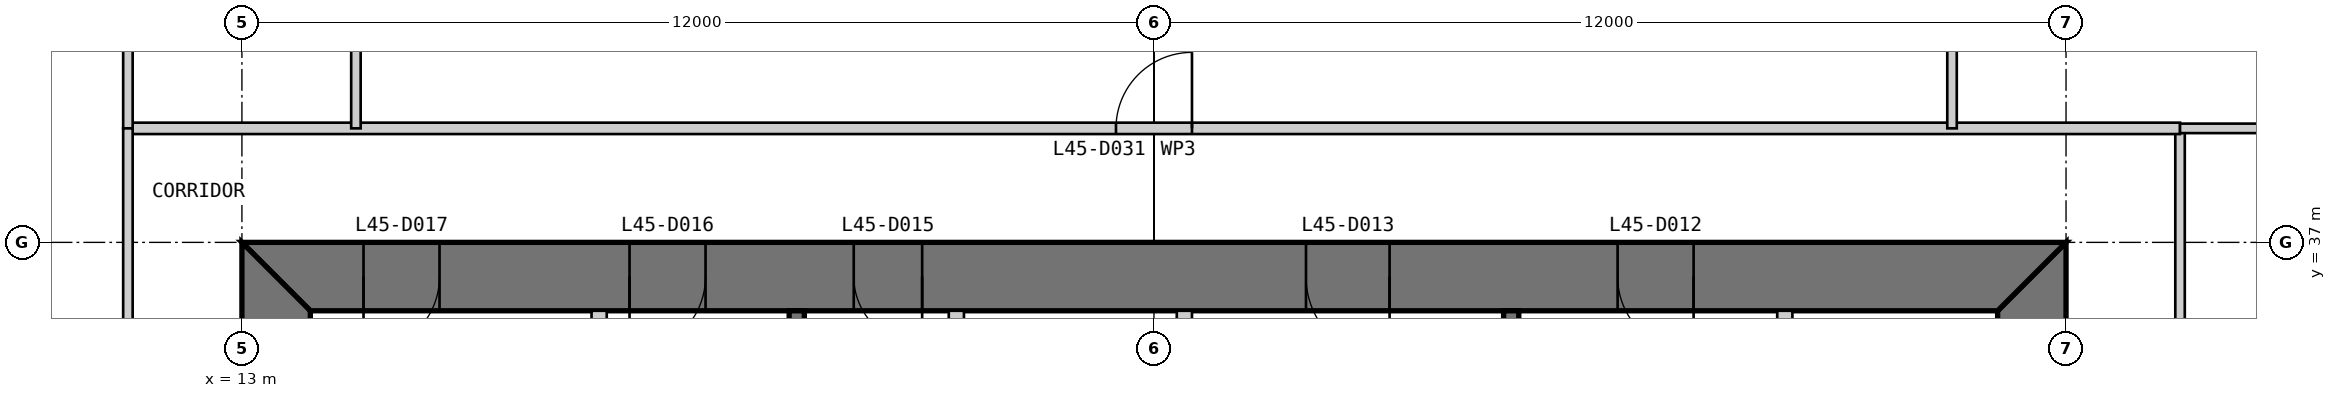
"""IFC4 building model, lengths in metres.
Left out: names, types, materials, properties, quantities, classifications, styles, units other than length and angle.
Written with IfcOpenShell. Run it as: python <this file> out.ifc"""

import sys

from ifc_helpers import new_model, si_unit, direction, frame, frame_2d, origin, place, context, subcontext, project, spatial, polyline, rectangle, outline, extrude, element, fill, save


model = new_model("IFC4")
c1 = context("Model", 3, precision=1e-05, world=origin(), true_north=direction((0.0, 1.0)))
c2 = subcontext(c1, "Body", "Model", "MODEL_VIEW")
j1 = project(units=[si_unit("LENGTHUNIT", "METRE"), si_unit("PLANEANGLEUNIT", "RADIAN")], contexts=[c1])
p1 = place(None, origin())
s1 = spatial("IfcSite", under=j1, at=p1, CompositionType="ELEMENT")
p2 = place(p1, origin())
s2 = spatial("IfcBuilding", under=s1, at=p2, CompositionType="ELEMENT")
p3 = place(p2, frame((0.0, 0.0, 193.8)))
s3 = spatial("IfcBuildingStorey", under=s2, at=p3, CompositionType="ELEMENT", Elevation=193.8)
p4 = place(p3, frame((36.55, 13.9, 0.0), z_axis=(0.0, 0.0, 1.0), x_axis=(0.0, 1.0, 0.0)))
e1 = element("IfcWall", 1, at=p4, inside=s3, PredefinedType="SHEAR", context=c2, shape_type="SweptSolid", body=[
    extrude(outline(polyline([(-0.9, -0.45), (23.1, -0.45), (22.2, 0.45), (0.0, 0.45), (-0.9, -0.45)])), origin(), (0.0, 0.0, 1.0), 4.0),
])
p5 = place(p4, frame((20.2, 0.0, 0.0)))
e2 = element("IfcOpeningElement", 2, at=p5, cuts=e1, PredefinedType="OPENING", context=c2, shape_type="SweptSolid", body=[
    extrude(rectangle(XDim=1.0, YDim=2.2, at=frame_2d((0.5, 1.1))), frame((0.0, 0.46, 0.0), z_axis=(0.0, -1.0, 0.0), x_axis=(1.0, 0.0, 0.0)), (0.0, 0.0, 1.0), 0.92),
])
p6 = place(p4, frame((17.25, 0.0, 0.0)))
e3 = element("IfcOpeningElement", 3, at=p6, cuts=e1, PredefinedType="OPENING", context=c2, shape_type="SweptSolid", body=[
    extrude(rectangle(XDim=0.9, YDim=2.2, at=frame_2d((0.45, 1.1))), frame((0.0, 0.46, 0.0), z_axis=(0.0, -1.0, 0.0), x_axis=(1.0, 0.0, 0.0)), (0.0, 0.0, 1.0), 0.92),
])
p7 = place(p3, frame((37.0, 36.55, 0.0), z_axis=(0.0, 0.0, 1.0), x_axis=(-1.0, 0.0, 0.0)))
e4 = element("IfcWall", 4, at=p7, inside=s3, PredefinedType="SHEAR", context=c2, shape_type="SweptSolid", body=[
    extrude(outline(polyline([(0.0, -0.45), (24.0, -0.45), (23.1, 0.45), (0.9, 0.45), (0.0, -0.45)])), origin(), (0.0, 0.0, 1.0), 4.0),
])
p8 = place(p7, frame((4.9, 0.0, 0.0)))
e5 = element("IfcOpeningElement", 5, at=p8, cuts=e4, PredefinedType="OPENING", context=c2, shape_type="SweptSolid", body=[
    extrude(rectangle(XDim=1.0, YDim=2.2, at=frame_2d((0.5, 1.1))), frame((0.0, 0.46, 0.0), z_axis=(0.0, -1.0, 0.0), x_axis=(1.0, 0.0, 0.0)), (0.0, 0.0, 1.0), 0.92),
])
p9 = place(p7, frame((8.9, 0.0, 0.0)))
e6 = element("IfcOpeningElement", 6, at=p9, cuts=e4, PredefinedType="OPENING", context=c2, shape_type="SweptSolid", body=[
    extrude(rectangle(XDim=1.1, YDim=2.2, at=frame_2d((0.55, 1.1))), frame((0.0, 0.46, 0.0), z_axis=(0.0, -1.0, 0.0), x_axis=(1.0, 0.0, 0.0)), (0.0, 0.0, 1.0), 0.92),
])
p10 = place(p7, frame((15.05, 0.0, 0.0)))
e7 = element("IfcOpeningElement", 7, at=p10, cuts=e4, PredefinedType="OPENING", context=c2, shape_type="SweptSolid", body=[
    extrude(rectangle(XDim=0.9, YDim=2.2, at=frame_2d((0.45, 1.1))), frame((0.0, 0.46, 0.0), z_axis=(0.0, -1.0, 0.0), x_axis=(1.0, 0.0, 0.0)), (0.0, 0.0, 1.0), 0.92),
])
p11 = place(p7, frame((17.9, 0.0, 0.0)))
e8 = element("IfcOpeningElement", 8, at=p11, cuts=e4, PredefinedType="OPENING", context=c2, shape_type="SweptSolid", body=[
    extrude(rectangle(XDim=1.0, YDim=2.2, at=frame_2d((0.5, 1.1))), frame((0.0, 0.46, 0.0), z_axis=(0.0, -1.0, 0.0), x_axis=(1.0, 0.0, 0.0)), (0.0, 0.0, 1.0), 0.92),
])
p12 = place(p7, frame((21.4, 0.0, 0.0)))
e9 = element("IfcOpeningElement", 9, at=p12, cuts=e4, PredefinedType="OPENING", context=c2, shape_type="SweptSolid", body=[
    extrude(rectangle(XDim=1.0, YDim=2.2, at=frame_2d((0.5, 1.1))), frame((0.0, 0.46, 0.0), z_axis=(0.0, -1.0, 0.0), x_axis=(1.0, 0.0, 0.0)), (0.0, 0.0, 1.0), 0.92),
])
p13 = place(p3, frame((13.45, 36.1, 0.0), z_axis=(0.0, 0.0, 1.0), x_axis=(0.0, -1.0, 0.0)))
e10 = element("IfcWall", 10, at=p13, inside=s3, PredefinedType="SHEAR", context=c2, shape_type="SweptSolid", body=[
    extrude(outline(polyline([(-0.9, -0.45), (23.1, -0.45), (22.2, 0.45), (0.0, 0.45), (-0.9, -0.45)])), origin(), (0.0, 0.0, 1.0), 4.0),
])
p14 = place(p13, frame((20.2, 0.0, 0.0)))
e11 = element("IfcOpeningElement", 11, at=p14, cuts=e10, PredefinedType="OPENING", context=c2, shape_type="SweptSolid", body=[
    extrude(rectangle(XDim=1.0, YDim=2.2, at=frame_2d((0.5, 1.1))), frame((0.0, 0.46, 0.0), z_axis=(0.0, -1.0, 0.0), x_axis=(1.0, 0.0, 0.0)), (0.0, 0.0, 1.0), 0.92),
])
p15 = place(p13, frame((17.25, 0.0, 0.0)))
e12 = element("IfcOpeningElement", 12, at=p15, cuts=e10, PredefinedType="OPENING", context=c2, shape_type="SweptSolid", body=[
    extrude(rectangle(XDim=0.9, YDim=2.2, at=frame_2d((0.45, 1.1))), frame((0.0, 0.46, 0.0), z_axis=(0.0, -1.0, 0.0), x_axis=(1.0, 0.0, 0.0)), (0.0, 0.0, 1.0), 0.92),
])
p16 = place(p3, frame((33.3, 36.1, 0.0), z_axis=(0.0, 0.0, 1.0), x_axis=(0.0, -1.0, 0.0)))
e13 = element("IfcWall", 13, at=p16, inside=s3, PredefinedType="PARTITIONING", context=c2, shape_type="SweptSolid", body=[
    extrude(rectangle(XDim=16.1, YDim=0.2, at=frame_2d((8.05, 0.0))), origin(), (0.0, 0.0, 1.0), 3.8),
])
p17 = place(p16, frame((4.1, 0.0, 0.0)))
e14 = element("IfcOpeningElement", 14, at=p17, cuts=e13, PredefinedType="OPENING", context=c2, shape_type="SweptSolid", body=[
    extrude(rectangle(XDim=0.9, YDim=2.2, at=frame_2d((0.45, 1.1))), frame((0.0, 0.11, 0.0), z_axis=(0.0, -1.0, 0.0), x_axis=(1.0, 0.0, 0.0)), (0.0, 0.0, 1.0), 0.22),
])
p18 = place(p3, frame((29.7, 36.1, 0.0), z_axis=(0.0, 0.0, 1.0), x_axis=(0.0, -1.0, 0.0)))
e15 = element("IfcWall", 15, at=p18, inside=s3, PredefinedType="SOLIDWALL", context=c2, shape_type="SweptSolid", body=[
    extrude(rectangle(XDim=16.1, YDim=0.2, at=frame_2d((8.05, 0.0))), origin(), (0.0, 0.0, 1.0), 3.8),
])
p19 = place(p18, frame((7.217, 0.0, 0.0)))
e16 = element("IfcOpeningElement", 16, at=p19, cuts=e15, PredefinedType="OPENING", context=c2, shape_type="SweptSolid", body=[
    extrude(rectangle(XDim=1.1, YDim=2.2, at=frame_2d((0.55, 1.1))), frame((0.0, 0.11, 0.0), z_axis=(0.0, -1.0, 0.0), x_axis=(1.0, 0.0, 0.0)), (0.0, 0.0, 1.0), 0.22),
])
p20 = place(p18, frame((10.55, 0.0, 0.0)))
e17 = element("IfcOpeningElement", 17, at=p20, cuts=e15, PredefinedType="OPENING", context=c2, shape_type="SweptSolid", body=[
    extrude(rectangle(XDim=1.1, YDim=2.2, at=frame_2d((0.55, 1.1))), frame((0.0, 0.11, 0.0), z_axis=(0.0, -1.0, 0.0), x_axis=(1.0, 0.0, 0.0)), (0.0, 0.0, 1.0), 0.22),
])
p21 = place(p18, frame((13.883, 0.0, 0.0)))
e18 = element("IfcOpeningElement", 18, at=p21, cuts=e15, PredefinedType="OPENING", context=c2, shape_type="SweptSolid", body=[
    extrude(rectangle(XDim=1.1, YDim=2.2, at=frame_2d((0.55, 1.1))), frame((0.0, 0.11, 0.0), z_axis=(0.0, -1.0, 0.0), x_axis=(1.0, 0.0, 0.0)), (0.0, 0.0, 1.0), 0.22),
])
p22 = place(p3, frame((25.4, 36.1, 0.0), z_axis=(0.0, 0.0, 1.0), x_axis=(0.0, -1.0, 0.0)))
e19 = element("IfcWall", 19, at=p22, inside=s3, PredefinedType="PARTITIONING", context=c2, shape_type="SweptSolid", body=[
    extrude(rectangle(XDim=3.3, YDim=0.2, at=frame_2d((1.65, 0.0))), origin(), (0.0, 0.0, 1.0), 3.8),
])
p23 = place(p22, frame((0.9, 0.0, 0.0)))
e20 = element("IfcOpeningElement", 20, at=p23, cuts=e19, PredefinedType="OPENING", context=c2, shape_type="SweptSolid", body=[
    extrude(rectangle(XDim=1.1, YDim=2.2, at=frame_2d((0.55, 1.1))), frame((0.0, 0.11, 0.0), z_axis=(0.0, -1.0, 0.0), x_axis=(1.0, 0.0, 0.0)), (0.0, 0.0, 1.0), 0.22),
])
p24 = place(p3, frame((22.4, 36.1, 0.0), z_axis=(0.0, 0.0, 1.0), x_axis=(0.0, -1.0, 0.0)))
e21 = element("IfcWall", 21, at=p24, inside=s3, PredefinedType="PARTITIONING", context=c2, shape_type="SweptSolid", body=[
    extrude(rectangle(XDim=3.3, YDim=0.2, at=frame_2d((1.65, 0.0))), origin(), (0.0, 0.0, 1.0), 3.8),
])
p25 = place(p3, frame((20.3, 36.1, 0.0), z_axis=(0.0, 0.0, 1.0), x_axis=(0.0, -1.0, 0.0)))
e22 = element("IfcWall", 22, at=p25, inside=s3, PredefinedType="SOLIDWALL", context=c2, shape_type="SweptSolid", body=[
    extrude(rectangle(XDim=6.1, YDim=0.2, at=frame_2d((3.05, 0.0))), origin(), (0.0, 0.0, 1.0), 3.8),
])
p26 = place(p3, frame((17.7, 36.1, 0.0), z_axis=(0.0, 0.0, 1.0), x_axis=(0.0, -1.0, 0.0)))
e23 = element("IfcWall", 23, at=p26, inside=s3, PredefinedType="PARTITIONING", context=c2, shape_type="SweptSolid", body=[
    extrude(rectangle(XDim=6.1, YDim=0.2, at=frame_2d((3.05, 0.0))), origin(), (0.0, 0.0, 1.0), 3.8),
])
p27 = place(p3, frame((38.5, 35.5, 0.0), z_axis=(0.0, 0.0, 1.0), x_axis=(0.0, 1.0, 0.0)))
e24 = element("IfcWall", 24, at=p27, inside=s3, PredefinedType="PARTITIONING", context=c2, shape_type="SweptSolid", body=[
    extrude(rectangle(XDim=3.0, YDim=0.125, at=frame_2d((1.5, 0.0))), origin(), (0.0, 0.0, 1.0), 3.85),
])
p28 = place(p3, frame((38.5, 38.5, 0.0), z_axis=(0.0, 0.0, 1.0), x_axis=(-1.0, 0.0, 0.0)))
e25 = element("IfcWall", 25, at=p28, inside=s3, PredefinedType="PARTITIONING", context=c2, shape_type="SweptSolid", body=[
    extrude(rectangle(XDim=27.0, YDim=0.15, at=frame_2d((13.5, 0.0))), origin(), (0.0, 0.0, 1.0), 3.85),
])
p29 = place(p28, frame((13.0, 0.0, 0.0)))
e26 = element("IfcOpeningElement", 26, at=p29, cuts=e25, PredefinedType="OPENING", context=c2, shape_type="SweptSolid", body=[
    extrude(rectangle(XDim=1.0, YDim=2.2, at=frame_2d((0.5, 1.1))), frame((0.0, 0.085, 0.0), z_axis=(0.0, -1.0, 0.0), x_axis=(1.0, 0.0, 0.0)), (0.0, 0.0, 1.0), 0.17),
])
p30 = place(p3, frame((49.85, 38.5, 0.0), z_axis=(0.0, 0.0, 1.0), x_axis=(-1.0, 0.0, 0.0)))
e27 = element("IfcWall", 27, at=p30, inside=s3, PredefinedType="PARTITIONING", context=c2, shape_type="SweptSolid", body=[
    extrude(rectangle(XDim=11.35, YDim=0.125, at=frame_2d((5.675, 0.0))), origin(), (0.0, 0.0, 1.0), 3.85),
])
p31 = place(p3, frame((35.5, 49.85, 0.0), z_axis=(0.0, 0.0, 1.0), x_axis=(0.0, -1.0, 0.0)))
e28 = element("IfcWall", 28, at=p31, inside=s3, PredefinedType="PARTITIONING", context=c2, shape_type="SweptSolid", body=[
    extrude(rectangle(XDim=11.35, YDim=0.125, at=frame_2d((5.675, 0.0))), origin(), (0.0, 0.0, 1.0), 3.85),
])
p32 = place(p31, frame((7.9, 0.0, 0.0)))
e29 = element("IfcOpeningElement", 29, at=p32, cuts=e28, PredefinedType="OPENING", context=c2, shape_type="SweptSolid", body=[
    extrude(rectangle(XDim=0.9, YDim=2.2, at=frame_2d((0.45, 1.1))), frame((0.0, 0.073, 0.0), z_axis=(0.0, -1.0, 0.0), x_axis=(1.0, 0.0, 0.0)), (0.0, 0.0, 1.0), 0.145),
])
p33 = place(p3, frame((14.5, 44.5, 0.0), z_axis=(0.0, 0.0, 1.0), x_axis=(0.0, -1.0, 0.0)))
e30 = element("IfcWall", 30, at=p33, inside=s3, PredefinedType="PARTITIONING", context=c2, shape_type="SweptSolid", body=[
    extrude(rectangle(XDim=6.0, YDim=0.125, at=frame_2d((3.0, 0.0))), origin(), (0.0, 0.0, 1.0), 3.85),
])
p34 = place(p33, frame((2.55, 0.0, 0.0)))
e31 = element("IfcOpeningElement", 31, at=p34, cuts=e30, PredefinedType="OPENING", context=c2, shape_type="SweptSolid", body=[
    extrude(rectangle(XDim=0.9, YDim=2.2, at=frame_2d((0.45, 1.1))), frame((0.0, 0.073, 0.0), z_axis=(0.0, -1.0, 0.0), x_axis=(1.0, 0.0, 0.0)), (0.0, 0.0, 1.0), 0.145),
])
p35 = place(p3, frame((11.5, 49.85, 0.0), z_axis=(0.0, 0.0, 1.0), x_axis=(0.0, -1.0, 0.0)))
e32 = element("IfcWall", 32, at=p35, inside=s3, PredefinedType="PARTITIONING", context=c2, shape_type="SweptSolid", body=[
    extrude(rectangle(XDim=11.35, YDim=0.125, at=frame_2d((5.675, 0.0))), origin(), (0.0, 0.0, 1.0), 3.85),
])
p36 = place(p3, frame((11.5, 38.5, 0.0), z_axis=(0.0, 0.0, 1.0), x_axis=(0.0, -1.0, 0.0)))
e33 = element("IfcWall", 33, at=p36, inside=s3, PredefinedType="PARTITIONING", context=c2, shape_type="SweptSolid", body=[
    extrude(rectangle(XDim=3.0, YDim=0.125, at=frame_2d((1.5, 0.0))), origin(), (0.0, 0.0, 1.0), 3.85),
])
p37 = place(p8, origin())
e34 = element("IfcDoor", 34, at=p37, inside=s3, OperationType="SINGLE_SWING_LEFT", PredefinedType="DOOR", context=c2, shape_type="SweptSolid", body=[
    extrude(rectangle(XDim=1.0, YDim=2.2, at=frame_2d((0.5, 1.1))), frame((0.0, 0.025, 0.0), z_axis=(0.0, -1.0, 0.0), x_axis=(1.0, 0.0, 0.0)), (0.0, 0.0, 1.0), 0.05),
    extrude(outline(polyline([(0.0, 0.0), (0.04, 0.0), (0.04, 2.16), (0.96, 2.16), (0.96, 0.0), (1.0, 0.0), (1.0, 2.2), (0.0, 2.2), (0.0, 0.0)])), frame((0.0, 0.3, 0.0), z_axis=(0.0, -1.0, 0.0), x_axis=(1.0, 0.0, 0.0)), (0.0, 0.0, 1.0), 0.6),
])
fill(e5, e34)
p38 = place(p9, origin())
e35 = element("IfcDoor", 35, at=p38, inside=s3, OperationType="SINGLE_SWING_LEFT", PredefinedType="DOOR", context=c2, shape_type="SweptSolid", body=[
    extrude(rectangle(XDim=1.1, YDim=2.2, at=frame_2d((0.55, 1.1))), frame((0.0, 0.025, 0.0), z_axis=(0.0, -1.0, 0.0), x_axis=(1.0, 0.0, 0.0)), (0.0, 0.0, 1.0), 0.05),
    extrude(outline(polyline([(0.0, 0.0), (0.04, 0.0), (0.04, 2.16), (1.06, 2.16), (1.06, 0.0), (1.1, 0.0), (1.1, 2.2), (0.0, 2.2), (0.0, 0.0)])), frame((0.0, 0.3, 0.0), z_axis=(0.0, -1.0, 0.0), x_axis=(1.0, 0.0, 0.0)), (0.0, 0.0, 1.0), 0.6),
])
fill(e6, e35)
p39 = place(p10, origin())
e36 = element("IfcDoor", 36, at=p39, inside=s3, OperationType="SINGLE_SWING_LEFT", PredefinedType="DOOR", context=c2, shape_type="SweptSolid", body=[
    extrude(rectangle(XDim=0.9, YDim=2.2, at=frame_2d((0.45, 1.1))), frame((0.0, 0.025, 0.0), z_axis=(0.0, -1.0, 0.0), x_axis=(1.0, 0.0, 0.0)), (0.0, 0.0, 1.0), 0.05),
    extrude(outline(polyline([(0.0, 0.0), (0.04, 0.0), (0.04, 2.16), (0.86, 2.16), (0.86, 0.0), (0.9, 0.0), (0.9, 2.2), (0.0, 2.2), (0.0, 0.0)])), frame((0.0, 0.3, 0.0), z_axis=(0.0, -1.0, 0.0), x_axis=(1.0, 0.0, 0.0)), (0.0, 0.0, 1.0), 0.6),
])
fill(e7, e36)
p40 = place(p11, origin())
e37 = element("IfcDoor", 37, at=p40, inside=s3, OperationType="SINGLE_SWING_RIGHT", PredefinedType="DOOR", context=c2, shape_type="SweptSolid", body=[
    extrude(rectangle(XDim=1.0, YDim=2.2, at=frame_2d((0.5, 1.1))), frame((0.0, 0.025, 0.0), z_axis=(0.0, -1.0, 0.0), x_axis=(1.0, 0.0, 0.0)), (0.0, 0.0, 1.0), 0.05),
    extrude(outline(polyline([(0.0, 0.0), (0.04, 0.0), (0.04, 2.16), (0.96, 2.16), (0.96, 0.0), (1.0, 0.0), (1.0, 2.2), (0.0, 2.2), (0.0, 0.0)])), frame((0.0, 0.3, 0.0), z_axis=(0.0, -1.0, 0.0), x_axis=(1.0, 0.0, 0.0)), (0.0, 0.0, 1.0), 0.6),
])
fill(e8, e37)
p41 = place(p12, origin())
e38 = element("IfcDoor", 38, at=p41, inside=s3, OperationType="SINGLE_SWING_RIGHT", PredefinedType="DOOR", context=c2, shape_type="SweptSolid", body=[
    extrude(rectangle(XDim=1.0, YDim=2.2, at=frame_2d((0.5, 1.1))), frame((0.0, 0.025, 0.0), z_axis=(0.0, -1.0, 0.0), x_axis=(1.0, 0.0, 0.0)), (0.0, 0.0, 1.0), 0.05),
    extrude(outline(polyline([(0.0, 0.0), (0.04, 0.0), (0.04, 2.16), (0.96, 2.16), (0.96, 0.0), (1.0, 0.0), (1.0, 2.2), (0.0, 2.2), (0.0, 0.0)])), frame((0.0, 0.3, 0.0), z_axis=(0.0, -1.0, 0.0), x_axis=(1.0, 0.0, 0.0)), (0.0, 0.0, 1.0), 0.6),
])
fill(e9, e38)
p42 = place(p29, frame((1.0, 0.0, 0.0), z_axis=(0.0, 0.0, 1.0), x_axis=(-1.0, 0.0, 0.0)))
e39 = element("IfcDoor", 39, at=p42, inside=s3, OperationType="SINGLE_SWING_RIGHT", PredefinedType="DOOR", context=c2, shape_type="SweptSolid", body=[
    extrude(rectangle(XDim=1.0, YDim=2.2, at=frame_2d((0.5, 1.1))), frame((0.0, 0.025, 0.0), z_axis=(0.0, -1.0, 0.0), x_axis=(1.0, 0.0, 0.0)), (0.0, 0.0, 1.0), 0.05),
])
fill(e26, e39)
save(model, sys.argv[1])
